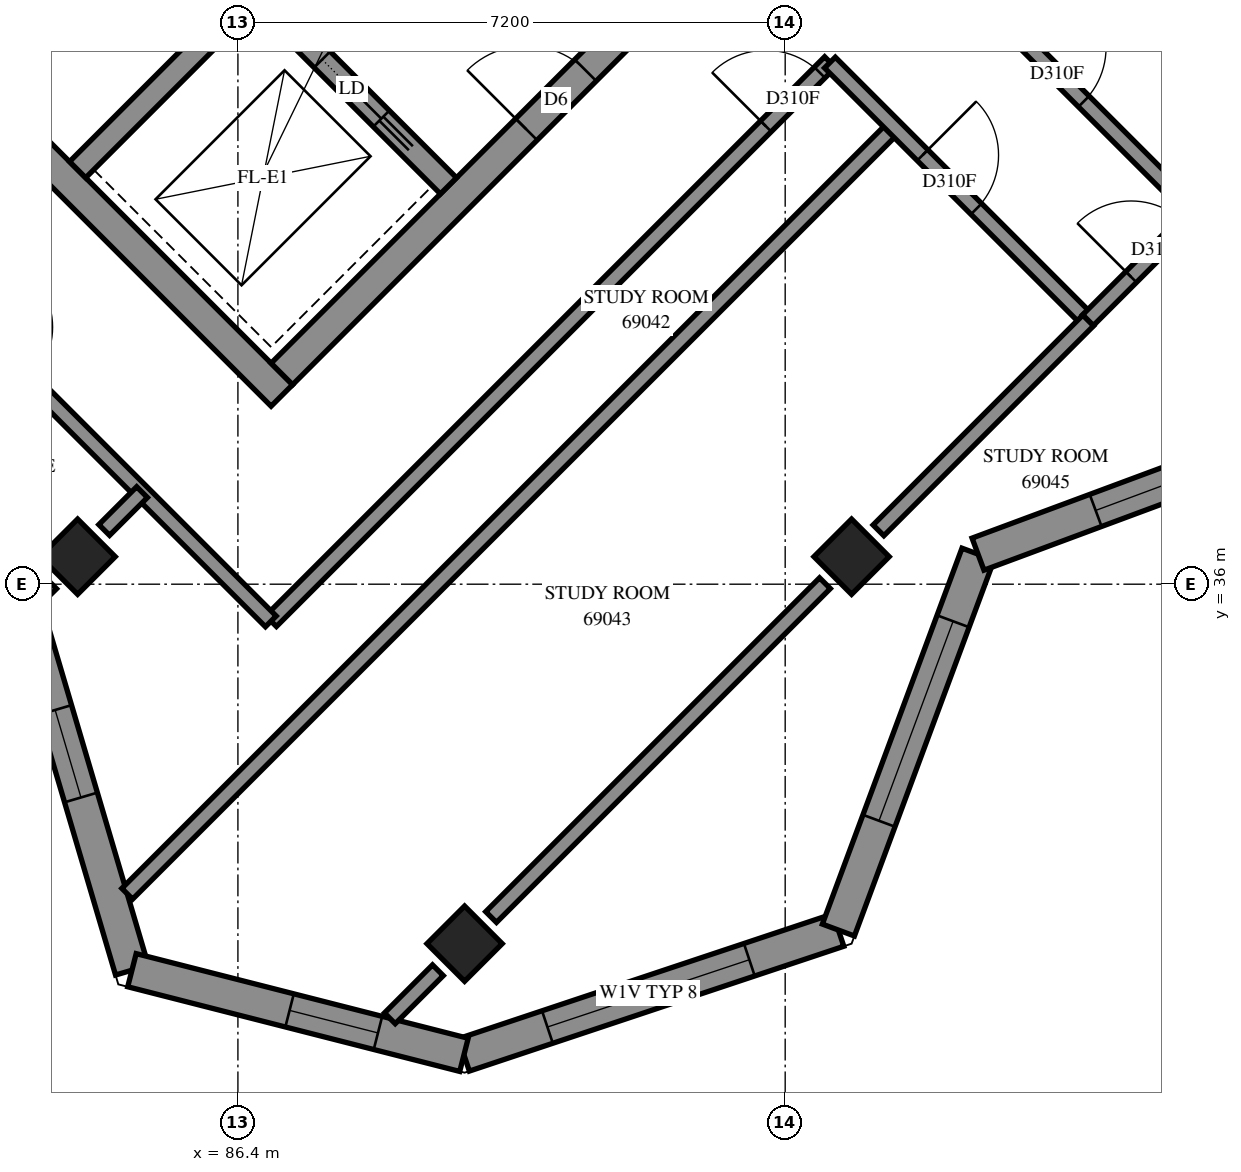
"""IFC4 building model, lengths in metres.
Left out: names, types, materials, properties, quantities, classifications, styles, units other than length and angle.
Written with IfcOpenShell. Run it as: python <this file> out.ifc"""

import sys

from ifc_helpers import new_model, si_unit, direction, frame, frame_2d, origin, origin_2d, place, context, subcontext, project, spatial, polyline, rectangle, outline, extrude, element, fill, save


model = new_model("IFC4")
c1 = context("Model", 3, precision=1e-05, world=origin(), true_north=direction((0.0, 1.0)))
c2 = subcontext(c1, "Body", "Model", "MODEL_VIEW")
j1 = project(units=[si_unit("LENGTHUNIT", "METRE"), si_unit("PLANEANGLEUNIT", "RADIAN")], contexts=[c1])
p1 = place(None, origin())
s1 = spatial("IfcSite", under=j1, at=p1, CompositionType="ELEMENT")
p2 = place(p1, origin())
s2 = spatial("IfcBuilding", under=s1, at=p2, CompositionType="ELEMENT")
p3 = place(p2, frame((0.0, 0.0, 254.0)))
s3 = spatial("IfcBuildingStorey", under=s2, at=p3, CompositionType="ELEMENT", Elevation=254.0)
for number, where, z_axis, x_axis in (
    (1, (84.291, 36.362, 0.0), (0.0, 0.0, 1.0), (0.707, -0.707, 0.0)),
    (2, (94.474, 36.362, 0.0), (0.0, 0.0, 1.0), (0.707, -0.707, 0.0)),
    (3, (89.382, 31.271, 0.0), (0.0, 0.0, 1.0), (0.707, -0.707, 0.0)),
):
    element("IfcColumn", number, at=place(p3, frame(where, z_axis=z_axis, x_axis=x_axis)), inside=s3, PredefinedType="COLUMN", context=c2, shape_type="SweptSolid", body=[
        extrude(rectangle(XDim=0.7, YDim=0.7, at=origin_2d()), origin(), (0.0, 0.0, 1.0), 3.1),
    ])
p4 = place(p3, frame((76.23, 49.231, -0.3), z_axis=(0.0, 0.0, 1.0), x_axis=(0.7071034917, -0.7071100706, 0.0)))
e4 = element("IfcWall", 4, at=p4, inside=s3, PredefinedType="SHEAR", context=c2, shape_type="SweptSolid", body=[
    extrude(rectangle(XDim=15.2, YDim=0.4, at=frame_2d((7.6, 0.0))), origin(), (0.0, 0.0, 1.0), 2.7),
])
p5 = place(p3, frame((86.978, 38.766, -0.3), z_axis=(0.0, 0.0, 1.0), x_axis=(0.7071067812, 0.7071067812, 0.0)))
e5 = element("IfcWall", 5, at=p5, inside=s3, PredefinedType="SHEAR", context=c2, shape_type="SweptSolid", body=[
    extrude(rectangle(XDim=14.4, YDim=0.4, at=frame_2d((7.2, 0.0))), origin(), (0.0, 0.0, 1.0), 2.7),
])
p6 = place(p5, frame((4.55, 0.0, 0.3)))
e6 = element("IfcOpeningElement", 6, at=p6, cuts=e5, PredefinedType="OPENING", context=c2, shape_type="SweptSolid", body=[
    extrude(rectangle(XDim=1.1, YDim=2.1, at=frame_2d((0.55, 1.05))), frame((0.0, 0.21, 0.0), z_axis=(0.0, -1.0, 0.0), x_axis=(1.0, 0.0, 0.0)), (0.0, 0.0, 1.0), 0.42),
])
p7 = place(p5, frame((11.35, 0.0, 0.3)))
e7 = element("IfcOpeningElement", 7, at=p7, cuts=e5, PredefinedType="OPENING", context=c2, shape_type="SweptSolid", body=[
    extrude(rectangle(XDim=1.1, YDim=2.1, at=frame_2d((0.55, 1.05))), frame((0.0, 0.21, 0.0), z_axis=(0.0, -1.0, 0.0), x_axis=(1.0, 0.0, 0.0)), (0.0, 0.0, 1.0), 0.42),
])
p8 = place(p3, frame((84.291, 41.453, 0.0), z_axis=(0.0, 0.0, 1.0), x_axis=(0.7071067812, 0.7071067812, 0.0)))
e8 = element("IfcWall", 8, at=p8, inside=s3, PredefinedType="SOLIDWALL", context=c2, shape_type="SweptSolid", body=[
    extrude(rectangle(XDim=3.3, YDim=0.3, at=frame_2d((1.65, 0.0))), origin(), (0.0, 0.0, 1.0), 3.1),
])
p9 = place(p3, frame((78.988, 51.423, 0.0), z_axis=(0.0, 0.0, 1.0), x_axis=(0.7071067812, -0.7071067812, 0.0)))
e9 = element("IfcWall", 9, at=p9, inside=s3, PredefinedType="SOLIDWALL", context=c2, shape_type="SweptSolid", body=[
    extrude(rectangle(XDim=14.4, YDim=0.3, at=frame_2d((7.2, 0.0))), origin(), (0.0, 0.0, 1.0), 3.1),
])
p10 = place(p9, frame((1.35, 0.0, 0.0)))
e10 = element("IfcOpeningElement", 10, at=p10, cuts=e9, PredefinedType="OPENING", context=c2, shape_type="SweptSolid", body=[
    extrude(rectangle(XDim=0.9, YDim=2.1, at=frame_2d((0.45, 1.05))), frame((0.0, 0.16, 0.0), z_axis=(0.0, -1.0, 0.0), x_axis=(1.0, 0.0, 0.0)), (0.0, 0.0, 1.0), 0.32),
])
p11 = place(p9, frame((4.95, 0.0, 0.0)))
e11 = element("IfcOpeningElement", 11, at=p11, cuts=e9, PredefinedType="OPENING", context=c2, shape_type="SweptSolid", body=[
    extrude(rectangle(XDim=0.9, YDim=2.1, at=frame_2d((0.45, 1.05))), frame((0.0, 0.16, 0.0), z_axis=(0.0, -1.0, 0.0), x_axis=(1.0, 0.0, 0.0)), (0.0, 0.0, 1.0), 0.32),
])
p12 = place(p9, frame((8.55, 0.0, 0.0)))
e12 = element("IfcOpeningElement", 12, at=p12, cuts=e9, PredefinedType="OPENING", context=c2, shape_type="SweptSolid", body=[
    extrude(rectangle(XDim=0.9, YDim=2.1, at=frame_2d((0.45, 1.05))), frame((0.0, 0.16, 0.0), z_axis=(0.0, -1.0, 0.0), x_axis=(1.0, 0.0, 0.0)), (0.0, 0.0, 1.0), 0.32),
])
p13 = place(p9, frame((12.05, 0.0, 0.0)))
e13 = element("IfcOpeningElement", 13, at=p13, cuts=e9, PredefinedType="OPENING", context=c2, shape_type="SweptSolid", body=[
    extrude(rectangle(XDim=1.1, YDim=2.1, at=frame_2d((0.55, 1.05))), frame((0.0, 0.16, 0.0), z_axis=(0.0, -1.0, 0.0), x_axis=(1.0, 0.0, 0.0)), (0.0, 0.0, 1.0), 0.32),
])
p14 = place(p3, frame((89.374, 29.808, 0.0), z_axis=(0.0, 0.0, 1.0), x_axis=(0.9486871496, 0.3162162112, 0.0)))
e14 = element("IfcWall", 14, at=p14, inside=s3, PredefinedType="SOLIDWALL", context=c2, shape_type="SweptSolid", body=[
    extrude(outline(polyline([(-0.066, -0.225), (5.301, -0.225), (5.085, 0.225), (0.066, 0.225), (-0.066, -0.225)])), origin(), (0.0, 0.0, 1.0), 3.1),
])
p15 = place(p14, frame((1.157, 0.0, 0.45)))
e15 = element("IfcOpeningElement", 15, at=p15, cuts=e14, PredefinedType="OPENING", context=c2, shape_type="SweptSolid", body=[
    extrude(rectangle(XDim=2.8, YDim=2.55, at=frame_2d((1.4, 1.275))), frame((0.0, 0.235, 0.0), z_axis=(0.0, -1.0, 0.0), x_axis=(1.0, 0.0, 0.0)), (0.0, 0.0, 1.0), 0.47),
])
p16 = place(p3, frame((94.3, 31.45, 0.0), z_axis=(0.0, 0.0, 1.0), x_axis=(0.3481927166, 0.9374229739, 0.0)))
e16 = element("IfcWall", 16, at=p16, inside=s3, PredefinedType="SOLIDWALL", context=c2, shape_type="SweptSolid", body=[
    extrude(outline(polyline([(-0.108, -0.225), (5.172, -0.225), (5.379, 0.225), (0.108, 0.225), (-0.108, -0.225)])), origin(), (0.0, 0.0, 1.0), 3.1),
])
p17 = place(p16, frame((1.534, 0.0, 0.45)))
e17 = element("IfcOpeningElement", 17, at=p17, cuts=e16, PredefinedType="OPENING", context=c2, shape_type="SweptSolid", body=[
    extrude(rectangle(XDim=2.8, YDim=2.55, at=frame_2d((1.4, 1.275))), frame((0.0, 0.235, 0.0), z_axis=(0.0, -1.0, 0.0), x_axis=(1.0, 0.0, 0.0)), (0.0, 0.0, 1.0), 0.47),
])
p18 = place(p3, frame((96.137, 36.395, 0.0), z_axis=(0.0, 0.0, 1.0), x_axis=(0.937429161, 0.3481760591, 0.0)))
e18 = element("IfcWall", 18, at=p18, inside=s3, PredefinedType="SOLIDWALL", context=c2, shape_type="SweptSolid", body=[
    extrude(outline(polyline([(0.103, -0.225), (5.383, -0.225), (5.168, 0.225), (-0.103, 0.225), (0.103, -0.225)])), origin(), (0.0, 0.0, 1.0), 3.1),
])
p19 = place(p18, frame((1.651, 0.0, 0.45)))
e19 = element("IfcOpeningElement", 19, at=p19, cuts=e18, PredefinedType="OPENING", context=c2, shape_type="SweptSolid", body=[
    extrude(rectangle(XDim=2.8, YDim=2.55, at=frame_2d((1.4, 1.275))), frame((0.0, 0.235, 0.0), z_axis=(0.0, -1.0, 0.0), x_axis=(1.0, 0.0, 0.0)), (0.0, 0.0, 1.0), 0.47),
])
p20 = place(p3, frame((83.704, 35.331, 0.0), z_axis=(0.0, 0.0, 1.0), x_axis=(0.2831424432, -0.959077868, 0.0)))
e20 = element("IfcWall", 20, at=p20, inside=s3, PredefinedType="SOLIDWALL", context=c2, shape_type="SweptSolid", body=[
    extrude(outline(polyline([(0.122, -0.225), (4.725, -0.225), (4.469, 0.225), (-0.122, 0.225), (0.122, -0.225)])), origin(), (0.0, 0.0, 1.0), 3.1),
])
p21 = place(p20, frame((1.028, 0.0, 0.45)))
e21 = element("IfcOpeningElement", 21, at=p21, cuts=e20, PredefinedType="OPENING", context=c2, shape_type="SweptSolid", body=[
    extrude(rectangle(XDim=1.2, YDim=2.55, at=frame_2d((0.6, 1.275))), frame((0.0, 0.235, 0.0), z_axis=(0.0, -1.0, 0.0), x_axis=(1.0, 0.0, 0.0)), (0.0, 0.0, 1.0), 0.47),
])
p22 = place(p3, frame((85.006, 30.922, 0.0), z_axis=(0.0, 0.0, 1.0), x_axis=(0.9689925633, -0.2470898869, 0.0)))
e22 = element("IfcWall", 22, at=p22, inside=s3, PredefinedType="SOLIDWALL", context=c2, shape_type="SweptSolid", body=[
    extrude(outline(polyline([(-0.128, -0.225), (4.574, -0.225), (4.442, 0.225), (0.128, 0.225), (-0.128, -0.225)])), origin(), (0.0, 0.0, 1.0), 3.1),
])
p23 = place(p22, frame((2.14, 0.0, 0.45)))
e23 = element("IfcOpeningElement", 23, at=p23, cuts=e22, PredefinedType="OPENING", context=c2, shape_type="SweptSolid", body=[
    extrude(rectangle(XDim=1.2, YDim=2.55, at=frame_2d((0.6, 1.275))), frame((0.0, 0.235, 0.0), z_axis=(0.0, -1.0, 0.0), x_axis=(1.0, 0.0, 0.0)), (0.0, 0.0, 1.0), 0.47),
])
p24 = place(p3, frame((84.944, 31.927, 0.0), z_axis=(0.0, 0.0, 1.0), x_axis=(0.7071768334, 0.7070367221, 0.0)))
e24 = element("IfcWall", 24, at=p24, inside=s3, PredefinedType="PARTITIONING", context=c2, shape_type="SweptSolid", body=[
    extrude(rectangle(XDim=14.274, YDim=0.2, at=frame_2d((7.137, 0.0))), origin(), (0.0, 0.0, 1.0), 3.1),
])
p25 = place(p3, frame((86.836, 35.514, 0.0), z_axis=(0.0, 0.0, 1.0), x_axis=(0.7071067812, 0.7071067812, 0.0)))
e25 = element("IfcWall", 25, at=p25, inside=s3, PredefinedType="PARTITIONING", context=c2, shape_type="SweptSolid", body=[
    extrude(rectangle(XDim=10.4, YDim=0.2, at=frame_2d((5.2, 0.0))), origin(), (0.0, 0.0, 1.0), 3.1),
])
p26 = place(p25, frame((9.207, 0.0, 0.0)))
e26 = element("IfcOpeningElement", 26, at=p26, cuts=e25, PredefinedType="OPENING", context=c2, shape_type="SweptSolid", body=[
    extrude(rectangle(XDim=1.0, YDim=2.1, at=frame_2d((0.5, 1.05))), frame((0.0, 0.11, 0.0), z_axis=(0.0, -1.0, 0.0), x_axis=(1.0, 0.0, 0.0)), (0.0, 0.0, 1.0), 0.22),
])
p27 = place(p3, frame((80.747, 41.597, 0.0), z_axis=(0.0, 0.0, 1.0), x_axis=(0.7071067812, -0.7071067812, 0.0)))
e27 = element("IfcWall", 27, at=p27, inside=s3, PredefinedType="PARTITIONING", context=c2, shape_type="SweptSolid", body=[
    extrude(rectangle(XDim=8.607, YDim=0.2, at=frame_2d((4.303, 0.0))), origin(), (0.0, 0.0, 1.0), 3.1),
])
p28 = place(p27, frame((0.195, 0.0, 0.0)))
e28 = element("IfcOpeningElement", 28, at=p28, cuts=e27, PredefinedType="OPENING", context=c2, shape_type="SweptSolid", body=[
    extrude(rectangle(XDim=1.0, YDim=2.1, at=frame_2d((0.5, 1.05))), frame((0.0, 0.11, 0.0), z_axis=(0.0, -1.0, 0.0), x_axis=(1.0, 0.0, 0.0)), (0.0, 0.0, 1.0), 0.22),
])
p29 = place(p27, frame((3.133, 0.0, 0.0)))
e29 = element("IfcOpeningElement", 29, at=p29, cuts=e27, PredefinedType="OPENING", context=c2, shape_type="SweptSolid", body=[
    extrude(rectangle(XDim=1.0, YDim=2.1, at=frame_2d((0.5, 1.05))), frame((0.0, 0.11, 0.0), z_axis=(0.0, -1.0, 0.0), x_axis=(1.0, 0.0, 0.0)), (0.0, 0.0, 1.0), 0.22),
])
p30 = place(p3, frame((89.731, 31.621, 0.0), z_axis=(0.0, 0.0, 1.0), x_axis=(0.7071067812, 0.7071067812, 0.0)))
e30 = element("IfcWall", 30, at=p30, inside=s3, PredefinedType="PARTITIONING", context=c2, shape_type="SweptSolid", body=[
    extrude(rectangle(XDim=6.211, YDim=0.2, at=frame_2d((3.106, 0.0))), origin(), (0.0, 0.0, 1.0), 2.6),
])
p31 = place(p3, frame((95.603, 44.277, 0.0), z_axis=(0.0, 0.0, 1.0), x_axis=(0.7071067812, -0.7071067812, 0.0)))
e31 = element("IfcWall", 31, at=p31, inside=s3, PredefinedType="PARTITIONING", context=c2, shape_type="SweptSolid", body=[
    extrude(rectangle(XDim=4.797, YDim=0.2, at=frame_2d((2.398, 0.0))), origin(), (0.0, 0.0, 1.0), 3.1),
])
p32 = place(p31, frame((1.723, 0.0, 0.0)))
e32 = element("IfcOpeningElement", 32, at=p32, cuts=e31, PredefinedType="OPENING", context=c2, shape_type="SweptSolid", body=[
    extrude(rectangle(XDim=1.0, YDim=2.1, at=frame_2d((0.5, 1.05))), frame((0.0, 0.11, 0.0), z_axis=(0.0, -1.0, 0.0), x_axis=(1.0, 0.0, 0.0)), (0.0, 0.0, 1.0), 0.22),
])
p33 = place(p3, frame((94.189, 42.863, 0.0), z_axis=(0.0, 0.0, 1.0), x_axis=(0.7071067812, -0.7071067812, 0.0)))
e33 = element("IfcWall", 33, at=p33, inside=s3, PredefinedType="PARTITIONING", context=c2, shape_type="SweptSolid", body=[
    extrude(rectangle(XDim=4.797, YDim=0.2, at=frame_2d((2.398, 0.0))), origin(), (0.0, 0.0, 1.0), 3.1),
])
p34 = place(p33, frame((1.723, 0.0, 0.0)))
e34 = element("IfcOpeningElement", 34, at=p34, cuts=e33, PredefinedType="OPENING", context=c2, shape_type="SweptSolid", body=[
    extrude(rectangle(XDim=1.0, YDim=2.1, at=frame_2d((0.5, 1.05))), frame((0.0, 0.11, 0.0), z_axis=(0.0, -1.0, 0.0), x_axis=(1.0, 0.0, 0.0)), (0.0, 0.0, 1.0), 0.22),
])
p35 = place(p3, frame((94.828, 36.709, 0.0), z_axis=(0.0, 0.0, 1.0), x_axis=(0.7068506295, 0.7073628401, 0.0)))
e35 = element("IfcWall", 35, at=p35, inside=s3, PredefinedType="PARTITIONING", context=c2, shape_type="SweptSolid", body=[
    extrude(rectangle(XDim=3.905, YDim=0.2, at=frame_2d((1.952, 0.0))), origin(), (0.0, 0.0, 1.0), 2.6),
])
p36 = place(p3, frame((97.584, 39.474, 0.0), z_axis=(0.0, 0.0, 1.0), x_axis=(0.7071067812, 0.7071067812, 0.0)))
e36 = element("IfcWall", 36, at=p36, inside=s3, PredefinedType="PARTITIONING", context=c2, shape_type="SweptSolid", body=[
    extrude(rectangle(XDim=2.0, YDim=0.2, at=frame_2d((1.0, 0.0))), origin(), (0.0, 0.0, 1.0), 2.6),
])
p37 = place(p36, frame((0.803, 0.0, 0.0)))
e37 = element("IfcOpeningElement", 37, at=p37, cuts=e36, PredefinedType="OPENING", context=c2, shape_type="SweptSolid", body=[
    extrude(rectangle(XDim=1.0, YDim=2.1, at=frame_2d((0.5, 1.05))), frame((0.0, 0.11, 0.0), z_axis=(0.0, -1.0, 0.0), x_axis=(1.0, 0.0, 0.0)), (0.0, 0.0, 1.0), 0.22),
])
p38 = place(p3, frame((88.399, 30.289, 0.0), z_axis=(0.0, 0.0, 1.0), x_axis=(0.7071067812, 0.7071067812, 0.0)))
e38 = element("IfcWall", 38, at=p38, inside=s3, PredefinedType="PARTITIONING", context=c2, shape_type="SweptSolid", body=[
    extrude(rectangle(XDim=0.894, YDim=0.2, at=frame_2d((0.447, 0.0))), origin(), (0.0, 0.0, 1.0), 3.1),
])
p39 = place(p3, frame((84.641, 36.713, 0.0), z_axis=(0.0, 0.0, 1.0), x_axis=(0.7071067812, 0.7071067812, 0.0)))
e39 = element("IfcWall", 39, at=p39, inside=s3, PredefinedType="PARTITIONING", context=c2, shape_type="SweptSolid", body=[
    extrude(rectangle(XDim=0.704, YDim=0.2, at=frame_2d((0.352, 0.0))), origin(), (0.0, 0.0, 1.0), 3.1),
])
p40 = place(p3, frame((83.543, 35.613, 0.0), z_axis=(0.0, 0.0, 1.0), x_axis=(0.7092312739, 0.7049758862, 0.0)))
e40 = element("IfcWall", 40, at=p40, inside=s3, PredefinedType="PARTITIONING", context=c2, shape_type="SweptSolid", body=[
    extrude(rectangle(XDim=0.564, YDim=0.2, at=frame_2d((0.282, 0.0))), origin(), (0.0, 0.0, 1.0), 3.1),
])
p41 = place(p15, origin())
e41 = element("IfcWindow", 41, at=p41, inside=s3, PartitioningType="SINGLE_PANEL", PredefinedType="WINDOW", context=c2, shape_type="SweptSolid", body=[
    extrude(rectangle(XDim=2.8, YDim=2.55, at=frame_2d((1.4, 1.275))), frame((0.0, 0.205, 0.0), z_axis=(0.0, -1.0, 0.0), x_axis=(1.0, 0.0, 0.0)), (0.0, 0.0, 1.0), 0.06),
])
fill(e15, e41)
p42 = place(p17, origin())
e42 = element("IfcWindow", 42, at=p42, inside=s3, PartitioningType="SINGLE_PANEL", PredefinedType="WINDOW", context=c2, shape_type="SweptSolid", body=[
    extrude(rectangle(XDim=2.8, YDim=2.55, at=frame_2d((1.4, 1.275))), frame((0.0, 0.205, 0.0), z_axis=(0.0, -1.0, 0.0), x_axis=(1.0, 0.0, 0.0)), (0.0, 0.0, 1.0), 0.06),
])
fill(e17, e42)
p43 = place(p19, origin())
e43 = element("IfcWindow", 43, at=p43, inside=s3, PartitioningType="SINGLE_PANEL", PredefinedType="WINDOW", context=c2, shape_type="SweptSolid", body=[
    extrude(rectangle(XDim=2.8, YDim=2.55, at=frame_2d((1.4, 1.275))), frame((0.0, 0.205, 0.0), z_axis=(0.0, -1.0, 0.0), x_axis=(1.0, 0.0, 0.0)), (0.0, 0.0, 1.0), 0.06),
])
fill(e19, e43)
p44 = place(p21, origin())
e44 = element("IfcWindow", 44, at=p44, inside=s3, PartitioningType="SINGLE_PANEL", PredefinedType="WINDOW", context=c2, shape_type="SweptSolid", body=[
    extrude(rectangle(XDim=1.2, YDim=2.55, at=frame_2d((0.6, 1.275))), frame((0.0, 0.205, 0.0), z_axis=(0.0, -1.0, 0.0), x_axis=(1.0, 0.0, 0.0)), (0.0, 0.0, 1.0), 0.06),
])
fill(e21, e44)
p45 = place(p23, origin())
e45 = element("IfcWindow", 45, at=p45, inside=s3, PartitioningType="SINGLE_PANEL", PredefinedType="WINDOW", context=c2, shape_type="SweptSolid", body=[
    extrude(rectangle(XDim=1.2, YDim=2.55, at=frame_2d((0.6, 1.275))), frame((0.0, 0.205, 0.0), z_axis=(0.0, -1.0, 0.0), x_axis=(1.0, 0.0, 0.0)), (0.0, 0.0, 1.0), 0.06),
])
fill(e23, e45)
p46 = place(p6, origin())
e46 = element("IfcDoor", 46, at=p46, inside=s3, OperationType="DOUBLE_DOOR_SINGLE_SWING", PredefinedType="DOOR", context=c2, shape_type="SweptSolid", body=[
    extrude(rectangle(XDim=1.1, YDim=2.1, at=frame_2d((0.55, 1.05))), frame((0.0, 0.025, 0.0), z_axis=(0.0, -1.0, 0.0), x_axis=(1.0, 0.0, 0.0)), (0.0, 0.0, 1.0), 0.05),
])
fill(e6, e46)
p47 = place(p13, origin())
e47 = element("IfcDoor", 47, at=p47, inside=s3, OperationType="SLIDING_TO_RIGHT", PredefinedType="DOOR", context=c2, shape_type="SweptSolid", body=[
    extrude(rectangle(XDim=1.1, YDim=2.1, at=frame_2d((0.55, 1.05))), frame((0.0, 0.025, 0.0), z_axis=(0.0, -1.0, 0.0), x_axis=(1.0, 0.0, 0.0)), (0.0, 0.0, 1.0), 0.05),
])
fill(e13, e47)
p48 = place(p26, origin())
e48 = element("IfcDoor", 48, at=p48, inside=s3, OperationType="SINGLE_SWING_RIGHT", PredefinedType="DOOR", context=c2, shape_type="SweptSolid", body=[
    extrude(rectangle(XDim=1.0, YDim=2.1, at=frame_2d((0.5, 1.05))), frame((0.0, 0.025, 0.0), z_axis=(0.0, -1.0, 0.0), x_axis=(1.0, 0.0, 0.0)), (0.0, 0.0, 1.0), 0.05),
])
fill(e26, e48)
p49 = place(p34, origin())
e49 = element("IfcDoor", 49, at=p49, inside=s3, OperationType="SINGLE_SWING_LEFT", PredefinedType="DOOR", context=c2, shape_type="SweptSolid", body=[
    extrude(rectangle(XDim=1.0, YDim=2.1, at=frame_2d((0.5, 1.05))), frame((0.0, 0.025, 0.0), z_axis=(0.0, -1.0, 0.0), x_axis=(1.0, 0.0, 0.0)), (0.0, 0.0, 1.0), 0.05),
])
fill(e34, e49)
p50 = place(p32, origin())
e50 = element("IfcDoor", 50, at=p50, inside=s3, OperationType="SINGLE_SWING_RIGHT", PredefinedType="DOOR", context=c2, shape_type="SweptSolid", body=[
    extrude(rectangle(XDim=1.0, YDim=2.1, at=frame_2d((0.5, 1.05))), frame((0.0, 0.025, 0.0), z_axis=(0.0, -1.0, 0.0), x_axis=(1.0, 0.0, 0.0)), (0.0, 0.0, 1.0), 0.05),
])
fill(e32, e50)
p51 = place(p37, origin())
e51 = element("IfcDoor", 51, at=p51, inside=s3, OperationType="SINGLE_SWING_RIGHT", PredefinedType="DOOR", context=c2, shape_type="SweptSolid", body=[
    extrude(rectangle(XDim=1.0, YDim=2.1, at=frame_2d((0.5, 1.05))), frame((0.0, 0.025, 0.0), z_axis=(0.0, -1.0, 0.0), x_axis=(1.0, 0.0, 0.0)), (0.0, 0.0, 1.0), 0.05),
])
fill(e37, e51)
save(model, sys.argv[1])
